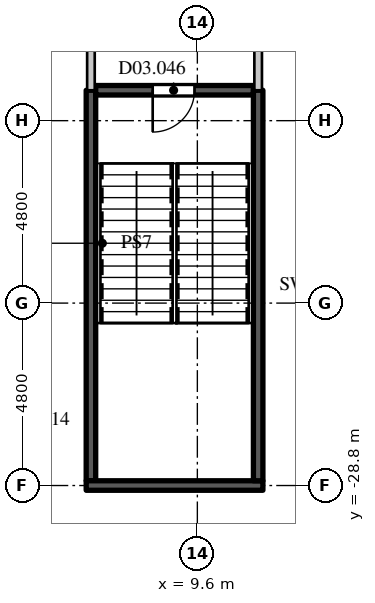
"""IFC4 building model, lengths in metres.
Left out: names, types, materials, properties, quantities, classifications, styles, units other than length and angle.
Written with IfcOpenShell. Run it as: python <this file> out.ifc"""

import sys

from ifc_helpers import new_model, si_unit, direction, frame, frame_2d, origin, place, context, subcontext, project, spatial, rectangle, extrude, element, fill, save


model = new_model("IFC4")
c1 = context("Model", 3, precision=1e-05, world=origin(), true_north=direction((0.0, 1.0)))
c2 = subcontext(c1, "Body", "Model", "MODEL_VIEW")
j1 = project(units=[si_unit("LENGTHUNIT", "METRE"), si_unit("PLANEANGLEUNIT", "RADIAN")], contexts=[c1])
p1 = place(None, origin())
s1 = spatial("IfcSite", under=j1, at=p1, CompositionType="ELEMENT")
p2 = place(p1, origin())
s2 = spatial("IfcBuilding", under=s1, at=p2, CompositionType="ELEMENT")
p3 = place(p2, frame((0.0, 0.0, 16.0)))
s3 = spatial("IfcBuildingStorey", under=s2, at=p3, CompositionType="ELEMENT", Elevation=16.0)
for number, where, z_axis, x_axis in (
    (1, (6.8, -18.4, 0.0), (0.0, 0.0, 1.0), (0.0, 1.0, 0.0)),
    (2, (11.2, -18.4, 0.0), (0.0, 0.0, 1.0), (0.0, 1.0, 0.0)),
):
    element("IfcWall", number, at=place(p3, frame(where, z_axis=z_axis, x_axis=x_axis)), inside=s3, PredefinedType="PARTITIONING", context=c2, shape_type="SweptSolid", body=[
        extrude(rectangle(XDim=4.386, YDim=0.2, at=frame_2d((2.193, 0.0))), origin(), (0.0, 0.0, 1.0), 4.4),
    ])
p4 = place(p3, frame((6.8, -28.675, 0.0), z_axis=(0.0, 0.0, 1.0), x_axis=(0.0, 1.0, 0.0)))
e3 = element("IfcWall", 3, at=p4, inside=s3, PredefinedType="SHEAR", context=c2, shape_type="SweptSolid", body=[
    extrude(rectangle(XDim=10.275, YDim=0.25, at=frame_2d((5.138, 0.0))), origin(), (0.0, 0.0, 1.0), 4.65),
])
p5 = place(p3, frame((6.675, -28.8, 0.0), z_axis=(0.0, 0.0, 1.0), x_axis=(1.0, 0.0, 0.0)))
e4 = element("IfcWall", 4, at=p5, inside=s3, PredefinedType="SHEAR", context=c2, shape_type="SweptSolid", body=[
    extrude(rectangle(XDim=4.65, YDim=0.25, at=frame_2d((2.325, 0.0))), origin(), (0.0, 0.0, 1.0), 4.65),
])
p6 = place(p3, frame((6.925, -18.4, 0.0), z_axis=(0.0, 0.0, 1.0), x_axis=(1.0, 0.0, 0.0)))
e5 = element("IfcWall", 5, at=p6, inside=s3, PredefinedType="SHEAR", context=c2, shape_type="SweptSolid", body=[
    extrude(rectangle(XDim=4.15, YDim=0.25, at=frame_2d((2.075, 0.0))), origin(), (0.0, 0.0, 1.0), 4.65),
])
p7 = place(p6, frame((1.5, 0.0, 0.0)))
e6 = element("IfcOpeningElement", 6, at=p7, cuts=e5, PredefinedType="OPENING", context=c2, shape_type="SweptSolid", body=[
    extrude(rectangle(XDim=1.1, YDim=2.2, at=frame_2d((0.55, 1.1))), frame((0.0, 0.135, 0.0), z_axis=(0.0, -1.0, 0.0), x_axis=(1.0, 0.0, 0.0)), (0.0, 0.0, 1.0), 0.27),
])
p8 = place(p3, frame((11.2, -28.675, 0.0), z_axis=(0.0, 0.0, 1.0), x_axis=(0.0, 1.0, 0.0)))
e7 = element("IfcWall", 7, at=p8, inside=s3, PredefinedType="SHEAR", context=c2, shape_type="SweptSolid", body=[
    extrude(rectangle(XDim=10.275, YDim=0.25, at=frame_2d((5.138, 0.0))), origin(), (0.0, 0.0, 1.0), 4.65),
])
p9 = place(p7, origin())
e8 = element("IfcDoor", 8, at=p9, inside=s3, OperationType="SINGLE_SWING_RIGHT", PredefinedType="DOOR", context=c2, shape_type="SweptSolid", body=[
    extrude(rectangle(XDim=1.1, YDim=2.2, at=frame_2d((0.55, 1.1))), frame((0.0, 0.025, 0.0), z_axis=(0.0, -1.0, 0.0), x_axis=(1.0, 0.0, 0.0)), (0.0, 0.0, 1.0), 0.05),
])
fill(e6, e8)
save(model, sys.argv[1])
